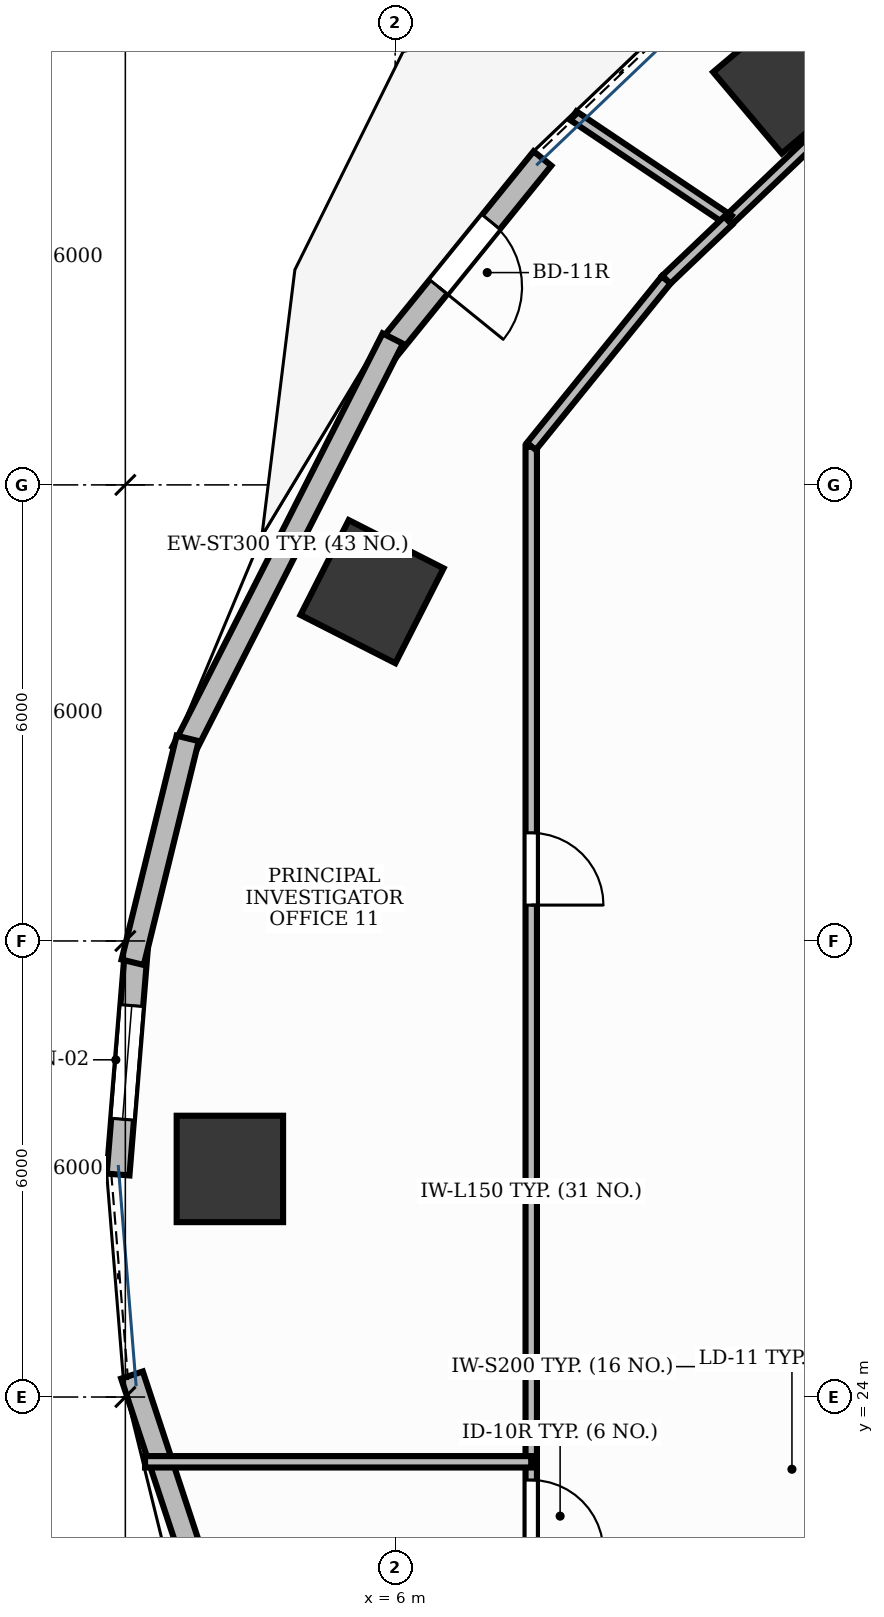
"""IFC4 building model, lengths in metres.
Left out: names, types, materials, properties, quantities, classifications, styles, units other than length and angle.
Written with IfcOpenShell. Run it as: python <this file> out.ifc"""

import sys

from ifc_helpers import new_model, si_unit, direction, frame, frame_2d, origin, origin_2d, place, context, subcontext, project, spatial, rectangle, extrude, element, fill, save


model = new_model("IFC4")
c1 = context("Model", 3, precision=1e-05, world=origin(), true_north=direction((0.0, 1.0)))
c2 = subcontext(c1, "Body", "Model", "MODEL_VIEW")
j1 = project(units=[si_unit("LENGTHUNIT", "METRE"), si_unit("PLANEANGLEUNIT", "RADIAN")], contexts=[c1])
p1 = place(None, origin())
s1 = spatial("IfcSite", under=j1, at=p1, CompositionType="ELEMENT")
p2 = place(p1, origin())
s2 = spatial("IfcBuilding", under=s1, at=p2, CompositionType="ELEMENT")
p3 = place(p2, frame((0.0, 0.0, 80.4)))
s3 = spatial("IfcBuildingStorey", under=s2, at=p3, CompositionType="ELEMENT", Elevation=80.4)
for number, where, z_axis, x_axis in (
    (1, (11.17, 41.347, -0.0), (0.0, 0.0, 1.0), (0.764, 0.645, 0.0)),
    (2, (5.696, 34.596, -0.0), (0.0, 0.0, 1.0), (0.453, 0.891, 0.0)),
    (3, (3.825, 27.001, -0.0), (0.0, 0.0, 1.0), (0.0, 1.0, 0.0)),
):
    element("IfcColumn", number, at=place(p3, frame(where, z_axis=z_axis, x_axis=x_axis)), inside=s3, PredefinedType="COLUMN", context=c2, shape_type="SweptSolid", body=[
        extrude(rectangle(XDim=1.4, YDim=1.4, at=origin_2d()), origin(), (0.0, 0.0, 1.0), 3.881),
    ])
p4 = place(p3, frame((7.938, 40.294, 0.0), z_axis=(0.0, 0.0, 1.0), x_axis=(-0.629295540187, -0.777166084631, 0.0)))
e4 = element("IfcWall", 4, at=p4, inside=s3, PredefinedType="STANDARD", context=c2, shape_type="SweptSolid", body=[
    extrude(rectangle(XDim=3.248, YDim=0.3, at=frame_2d((1.624, 0.0))), origin(), (0.0, 0.0, 1.0), 3.88),
])
p5 = place(p4, frame((1.074, 0.0, 0.0)))
e5 = element("IfcOpeningElement", 5, at=p5, cuts=e4, PredefinedType="OPENING", context=c2, shape_type="SweptSolid", body=[
    extrude(rectangle(XDim=1.1, YDim=2.15, at=frame_2d((0.55, 1.075))), frame((0.0, 0.165, 0.0), z_axis=(0.0, -1.0, 0.0), x_axis=(1.0, 0.0, 0.0)), (0.0, 0.0, 1.0), 0.33),
])
p6 = place(p3, frame((2.594, 29.878, 0.0), z_axis=(0.0, 0.0, 1.0), x_axis=(-0.08090887827, -0.996721502435, 0.0)))
e6 = element("IfcWall", 6, at=p6, inside=s3, PredefinedType="STANDARD", context=c2, shape_type="SweptSolid", body=[
    extrude(rectangle(XDim=2.96, YDim=0.3, at=frame_2d((1.48, 0.0))), origin(), (0.0, 0.0, 1.0), 3.88),
])
p7 = place(p6, frame((0.73, 0.0, 0.95)))
e7 = element("IfcOpeningElement", 7, at=p7, cuts=e6, PredefinedType="OPENING", context=c2, shape_type="SweptSolid", body=[
    extrude(rectangle(XDim=1.5, YDim=1.8, at=frame_2d((0.75, 0.9))), frame((0.0, 0.165, 0.0), z_axis=(0.0, -1.0, 0.0), x_axis=(1.0, 0.0, 0.0)), (0.0, 0.0, 1.0), 0.33),
])
p8 = place(p3, frame((5.969, 37.926, 0.0), z_axis=(0.0, 0.0, 1.0), x_axis=(-0.453093111502, -0.891463197395, 0.0)))
e8 = element("IfcWall", 8, at=p8, inside=s3, PredefinedType="STANDARD", context=c2, shape_type="SweptSolid", body=[
    extrude(rectangle(XDim=6.102, YDim=0.3, at=frame_2d((3.051, 0.0))), origin(), (0.0, 0.0, 1.0), 3.88),
])
p9 = place(p3, frame((3.27, 32.665, 0.0), z_axis=(0.0, 0.0, 1.0), x_axis=(-0.23859399274, -0.971119409047, 0.0)))
e9 = element("IfcWall", 9, at=p9, inside=s3, PredefinedType="STANDARD", context=c2, shape_type="SweptSolid", body=[
    extrude(rectangle(XDim=3.033, YDim=0.3, at=frame_2d((1.517, 0.0))), origin(), (0.0, 0.0, 1.0), 3.88),
])
p10 = place(p3, frame((2.537, 24.289, 0.0), z_axis=(0.0, 0.0, 1.0), x_axis=(0.31372816724, -0.949512841978, 0.0)))
e10 = element("IfcWall", 10, at=p10, inside=s3, PredefinedType="STANDARD", context=c2, shape_type="SweptSolid", body=[
    extrude(rectangle(XDim=5.951, YDim=0.3, at=frame_2d((2.976, 0.0))), origin(), (0.0, 0.0, 1.0), 3.88),
])
p11 = place(p3, frame((7.79, 23.148, 0.0), z_axis=(0.0, 0.0, 1.0), x_axis=(0.0, -1.0, 0.0)))
e11 = element("IfcWall", 11, at=p11, inside=s3, PredefinedType="PARTITIONING", context=c2, shape_type="SweptSolid", body=[
    extrude(rectangle(XDim=5.649, YDim=0.15, at=frame_2d((2.825, 0.0))), origin(), (0.0, 0.0, 1.0), 2.22),
])
p12 = place(p11, frame((0.24, 0.0, 0.0)))
e12 = element("IfcOpeningElement", 12, at=p12, cuts=e11, PredefinedType="OPENING", context=c2, shape_type="SweptSolid", body=[
    extrude(rectangle(XDim=0.95, YDim=2.15, at=frame_2d((0.475, 1.075))), frame((0.0, 0.09, 0.0), z_axis=(0.0, -1.0, 0.0), x_axis=(1.0, 0.0, 0.0)), (0.0, 0.0, 1.0), 0.18),
])
p13 = place(p3, frame((7.79, 36.501, 0.0), z_axis=(0.0, 0.0, 1.0), x_axis=(0.0, -1.0, 0.0)))
e13 = element("IfcWall", 13, at=p13, inside=s3, PredefinedType="PARTITIONING", context=c2, shape_type="SweptSolid", body=[
    extrude(rectangle(XDim=13.343, YDim=0.15, at=frame_2d((6.672, 0.0))), origin(), (0.0, 0.0, 1.0), 2.22),
])
p14 = place(p13, frame((5.079, 0.0, 0.0)))
e14 = element("IfcOpeningElement", 14, at=p14, cuts=e13, PredefinedType="OPENING", context=c2, shape_type="SweptSolid", body=[
    extrude(rectangle(XDim=0.95, YDim=2.15, at=frame_2d((0.475, 1.075))), frame((0.0, 0.09, 0.0), z_axis=(0.0, -1.0, 0.0), x_axis=(1.0, 0.0, 0.0)), (0.0, 0.0, 1.0), 0.18),
])
p15 = place(p3, frame((2.709, 23.148, 0.0), z_axis=(0.0, 0.0, 1.0), x_axis=(1.0, 0.0, 0.0)))
e15 = element("IfcWall", 15, at=p15, inside=s3, PredefinedType="PARTITIONING", context=c2, shape_type="SweptSolid", body=[
    extrude(rectangle(XDim=5.081, YDim=0.15, at=frame_2d((2.541, 0.0))), origin(), (0.0, 0.0, 1.0), 2.22),
])
p16 = place(p3, frame((11.693, 40.727, 0.0), z_axis=(0.0, 0.0, 1.0), x_axis=(-0.72364154489, -0.69017600256, 0.0)))
e16 = element("IfcWall", 16, at=p16, inside=s3, PredefinedType="PARTITIONING", context=c2, shape_type="SweptSolid", body=[
    extrude(rectangle(XDim=1.802, YDim=0.14, at=frame_2d((0.901, 0.0))), origin(), (0.0, 0.0, 1.0), 2.22),
])
p17 = place(p3, frame((10.389, 39.483, 0.0), z_axis=(0.0, 0.0, 1.0), x_axis=(-0.8301994927, 0.557466413626, 0.0)))
e17 = element("IfcWall", 17, at=p17, inside=s3, PredefinedType="PARTITIONING", context=c2, shape_type="SweptSolid", body=[
    extrude(rectangle(XDim=2.462, YDim=0.14, at=frame_2d((1.231, 0.0))), origin(), (0.0, 0.0, 1.0), 2.22),
])
p18 = place(p3, frame((10.382, 39.476, 0.0), z_axis=(0.0, 0.0, 1.0), x_axis=(-0.723689756345, -0.690125449872, 0.0)))
e18 = element("IfcWall", 18, at=p18, inside=s3, PredefinedType="PARTITIONING", context=c2, shape_type="SweptSolid", body=[
    extrude(rectangle(XDim=1.127, YDim=0.15, at=frame_2d((0.564, 0.0))), origin(), (0.0, 0.0, 1.0), 2.22),
])
p19 = place(p3, frame((9.565, 38.697, 0.0), z_axis=(0.0, 0.0, 1.0), x_axis=(-0.629270515505, -0.777186347227, 0.0)))
e19 = element("IfcWall", 19, at=p19, inside=s3, PredefinedType="PARTITIONING", context=c2, shape_type="SweptSolid", body=[
    extrude(rectangle(XDim=2.817, YDim=0.15, at=frame_2d((1.409, 0.0))), origin(), (0.0, 0.0, 1.0), 2.22),
])
p20 = place(p5, origin())
e20 = element("IfcDoor", 20, at=p20, inside=s3, OperationType="SINGLE_SWING_RIGHT", PredefinedType="DOOR", context=c2, shape_type="SweptSolid", body=[
    extrude(rectangle(XDim=1.1, YDim=2.15, at=frame_2d((0.55, 1.075))), frame((0.0, 0.025, 0.0), z_axis=(0.0, -1.0, 0.0), x_axis=(1.0, 0.0, 0.0)), (0.0, 0.0, 1.0), 0.05),
])
fill(e5, e20)
p21 = place(p7, origin())
e21 = element("IfcWindow", 21, at=p21, inside=s3, PartitioningType="DOUBLE_PANEL_VERTICAL", PredefinedType="WINDOW", context=c2, shape_type="SweptSolid", body=[
    extrude(rectangle(XDim=1.5, YDim=1.8, at=frame_2d((0.75, 0.9))), frame((0.0, 0.03, 0.0), z_axis=(0.0, -1.0, 0.0), x_axis=(1.0, 0.0, 0.0)), (0.0, 0.0, 1.0), 0.06),
])
fill(e7, e21)
p22 = place(p12, origin())
e22 = element("IfcDoor", 22, at=p22, inside=s3, OperationType="SINGLE_SWING_RIGHT", PredefinedType="DOOR", context=c2, shape_type="SweptSolid", body=[
    extrude(rectangle(XDim=0.95, YDim=2.15, at=frame_2d((0.475, 1.075))), frame((0.0, 0.025, 0.0), z_axis=(0.0, -1.0, 0.0), x_axis=(1.0, 0.0, 0.0)), (0.0, 0.0, 1.0), 0.05),
])
fill(e12, e22)
p23 = place(p14, origin())
e23 = element("IfcDoor", 23, at=p23, inside=s3, OperationType="SINGLE_SWING_RIGHT", PredefinedType="DOOR", context=c2, shape_type="SweptSolid", body=[
    extrude(rectangle(XDim=0.95, YDim=2.15, at=frame_2d((0.475, 1.075))), frame((0.0, 0.025, 0.0), z_axis=(0.0, -1.0, 0.0), x_axis=(1.0, 0.0, 0.0)), (0.0, 0.0, 1.0), 0.05),
])
fill(e14, e23)
save(model, sys.argv[1])
